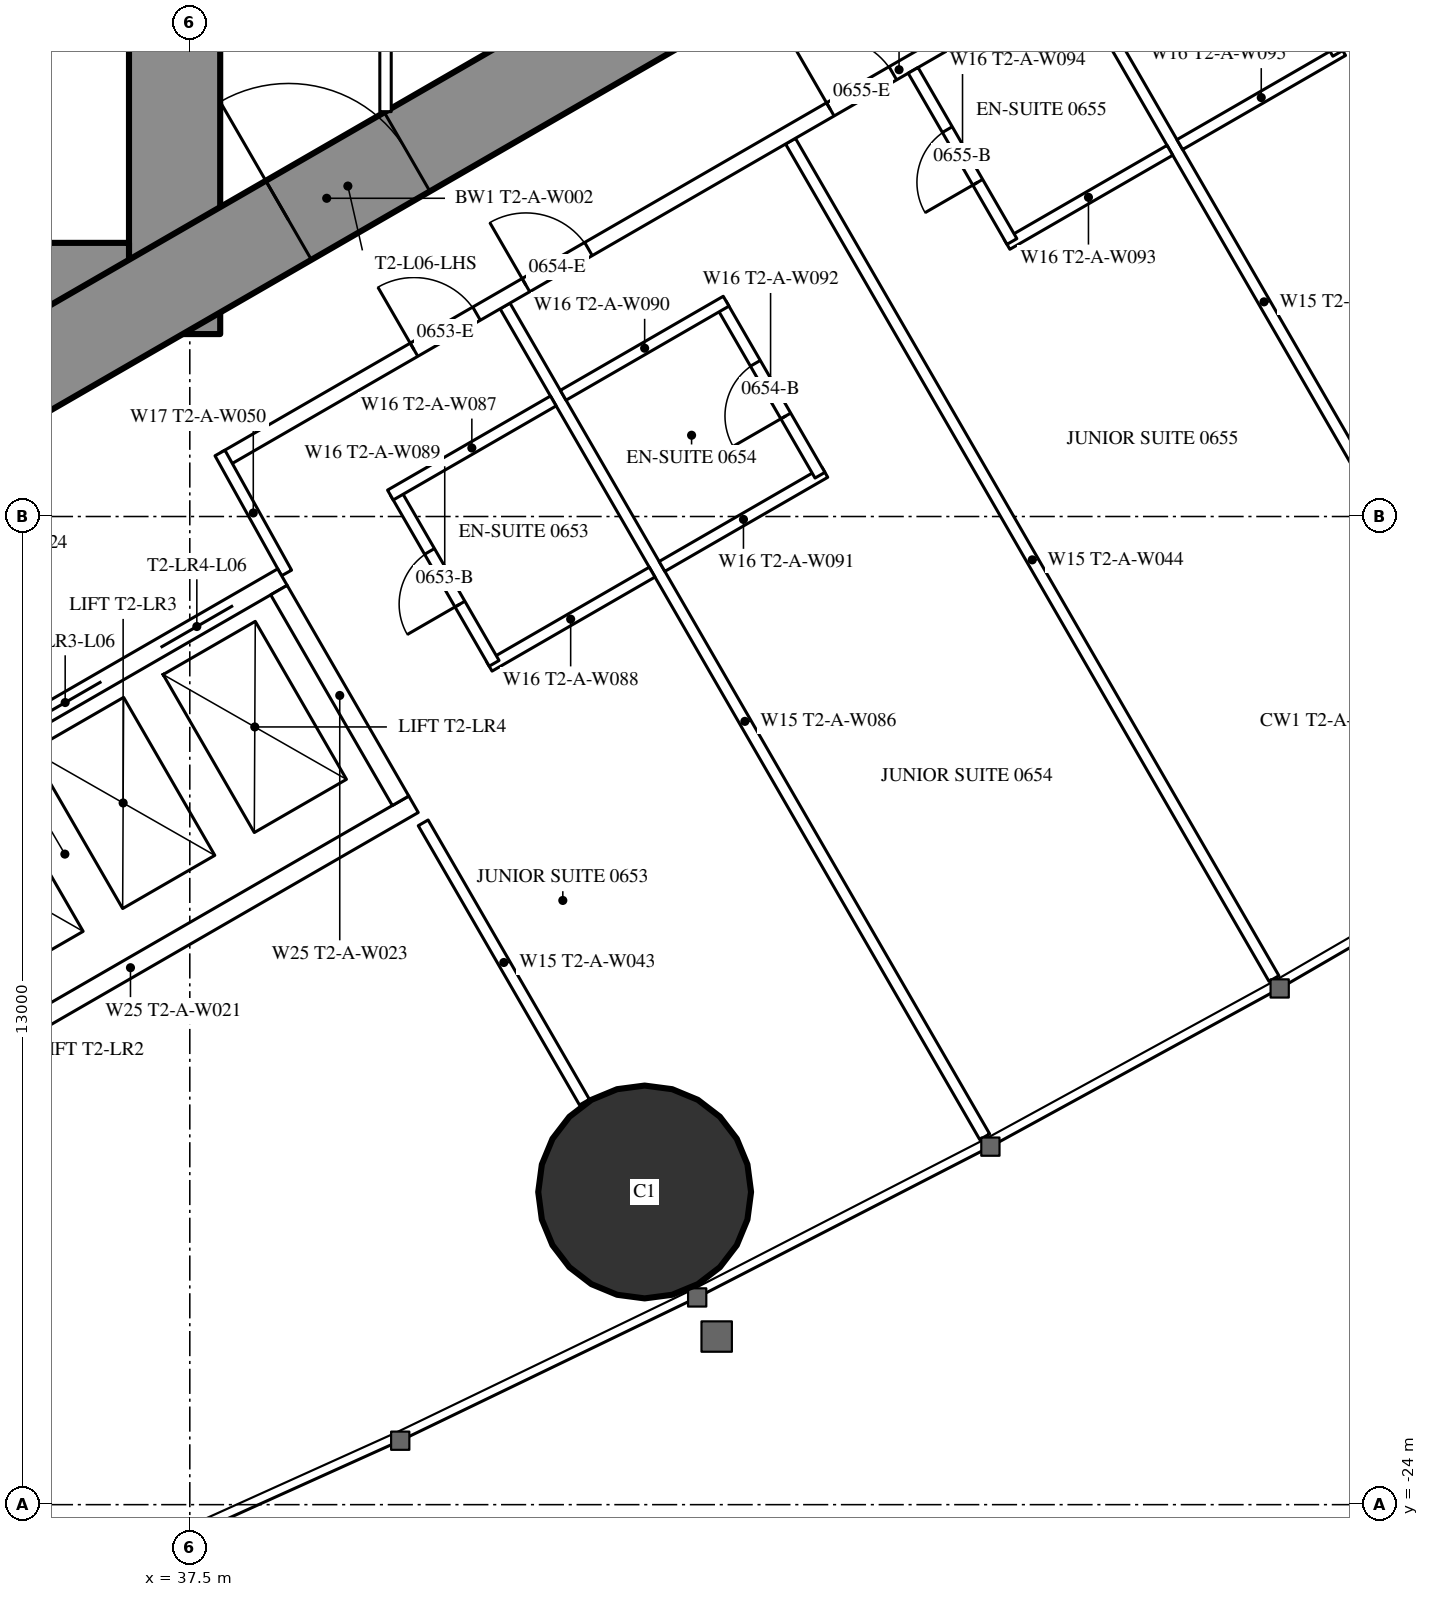
"""IFC4 building model, lengths in metres.
Left out: names, types, materials, properties, quantities, classifications, styles, units other than length and angle.
Written with IfcOpenShell. Run it as: python <this file> out.ifc"""

import sys

from ifc_helpers import new_model, si_unit, direction, frame, frame_2d, origin, origin_2d, place, context, subcontext, project, spatial, rectangle, hollow_circle, extrude, element, fill, save


model = new_model("IFC4")
c1 = context("Model", 3, precision=1e-05, world=origin(), true_north=direction((0.0, 1.0)))
c2 = subcontext(c1, "Body", "Model", "MODEL_VIEW")
j1 = project(units=[si_unit("LENGTHUNIT", "METRE"), si_unit("PLANEANGLEUNIT", "RADIAN")], contexts=[c1])
p1 = place(None, origin())
s1 = spatial("IfcSite", under=j1, at=p1, CompositionType="ELEMENT")
p2 = place(p1, origin())
s2 = spatial("IfcBuilding", under=s1, at=p2, CompositionType="ELEMENT")
p3 = place(p2, frame((0.0, 0.0, 28.5)))
s3 = spatial("IfcBuildingStorey", under=s2, at=p3, CompositionType="ELEMENT", Elevation=28.5)
p4 = place(p3, frame((43.484, -19.886, 0.0), z_axis=(0.0, 0.0, 1.0), x_axis=(1.0, 0.0, 0.0)))
e1 = element("IfcColumn", 1, at=p4, inside=s3, PredefinedType="COLUMN", context=c2, shape_type="SweptSolid", body=[
    extrude(hollow_circle(Radius=1.4, WallThickness=0.12, at=origin_2d()), origin(), (0.0, 0.0, 1.0), 3.5),
])
p5 = place(p3, frame((37.3, -8.6, 0.0), z_axis=(0.0, 0.0, 1.0), x_axis=(0.0, 1.0, 0.0)))
e2 = element("IfcWall", 2, at=p5, inside=s3, PredefinedType="SHEAR", context=c2, shape_type="SweptSolid", body=[
    extrude(rectangle(XDim=17.2, YDim=1.2, at=frame_2d((8.6, 0.0))), origin(), (0.0, 0.0, 1.0), 3.5),
])
p6 = place(p5, frame((7.7, 0.0, 0.0)))
e3 = element("IfcOpeningElement", 3, at=p6, cuts=e2, PredefinedType="OPENING", context=c2, shape_type="SweptSolid", body=[
    extrude(rectangle(XDim=1.8, YDim=2.2, at=frame_2d((0.9, 1.1))), frame((0.0, 0.61, 0.0), z_axis=(0.0, -1.0, 0.0), x_axis=(1.0, 0.0, 0.0)), (0.0, 0.0, 1.0), 1.22),
])
p7 = place(p3, frame((28.3, -8.0, 0.0), z_axis=(0.0, 0.0, 1.0), x_axis=(1.0, 0.0, 0.0)))
e4 = element("IfcWall", 4, at=p7, inside=s3, PredefinedType="SHEAR", context=c2, shape_type="SweptSolid", body=[
    extrude(rectangle(XDim=8.4, YDim=1.2, at=frame_2d((4.2, 0.0))), origin(), (0.0, 0.0, 1.0), 3.5),
])
p8 = place(p7, frame((0.25, 0.0, 0.0)))
e5 = element("IfcOpeningElement", 5, at=p8, cuts=e4, PredefinedType="OPENING", context=c2, shape_type="SweptSolid", body=[
    extrude(rectangle(XDim=1.0, YDim=2.2, at=frame_2d((0.5, 1.1))), frame((0.0, 0.61, 0.0), z_axis=(0.0, -1.0, 0.0), x_axis=(1.0, 0.0, 0.0)), (0.0, 0.0, 1.0), 1.22),
])
p9 = place(p3, frame((27.2, -13.8, 0.0), z_axis=(0.0, 0.0, 1.0), x_axis=(0.866027159892, 0.499996958321, 0.0)))
e6 = element("IfcWall", 6, at=p9, inside=s3, PredefinedType="SHEAR", context=c2, shape_type="SweptSolid", body=[
    extrude(rectangle(XDim=27.947, YDim=1.2, at=frame_2d((13.973, 0.0))), origin(), (0.0, 0.0, 1.0), 3.5),
])
p10 = place(p9, frame((4.6, 0.0, 0.0)))
e7 = element("IfcOpeningElement", 7, at=p10, cuts=e6, PredefinedType="OPENING", context=c2, shape_type="SweptSolid", body=[
    extrude(rectangle(XDim=1.0, YDim=2.2, at=frame_2d((0.5, 1.1))), frame((0.0, 0.61, 0.0), z_axis=(0.0, -1.0, 0.0), x_axis=(1.0, 0.0, 0.0)), (0.0, 0.0, 1.0), 1.22),
])
p11 = place(p9, frame((13.395, 0.0, 0.0)))
e8 = element("IfcOpeningElement", 8, at=p11, cuts=e6, PredefinedType="OPENING", context=c2, shape_type="SweptSolid", body=[
    extrude(rectangle(XDim=1.8, YDim=2.2, at=frame_2d((0.9, 1.1))), frame((0.0, 0.61, 0.0), z_axis=(0.0, -1.0, 0.0), x_axis=(1.0, 0.0, 0.0)), (0.0, 0.0, 1.0), 1.22),
])
p12 = place(p3, frame((41.647, -8.23, 0.0), z_axis=(0.0, 0.0, 1.0), x_axis=(0.49998590462, -0.866033541603, 0.0)))
e9 = element("IfcWall", 9, at=p12, inside=s3, PredefinedType="PARTITIONING", context=c2, shape_type="SweptSolid", body=[
    extrude(rectangle(XDim=12.621, YDim=0.15, at=frame_2d((6.311, 0.0))), origin(), (0.0, 0.0, 1.0), 3.25),
])
p13 = place(p3, frame((45.403, -6.062, 0.0), z_axis=(0.0, 0.0, 1.0), x_axis=(0.500007077968, -0.866021317279, 0.0)))
e10 = element("IfcWall", 10, at=p13, inside=s3, PredefinedType="PARTITIONING", context=c2, shape_type="SweptSolid", body=[
    extrude(rectangle(XDim=12.721, YDim=0.15, at=frame_2d((6.361, 0.0))), origin(), (0.0, 0.0, 1.0), 3.25),
])
p14 = place(p3, frame((49.159, -3.893, 0.0), z_axis=(0.0, 0.0, 1.0), x_axis=(0.499998773722, -0.866026111775, 0.0)))
e11 = element("IfcWall", 11, at=p14, inside=s3, PredefinedType="PARTITIONING", context=c2, shape_type="SweptSolid", body=[
    extrude(rectangle(XDim=9.892, YDim=0.15, at=frame_2d((4.946, 0.0))), origin(), (0.0, 0.0, 1.0), 2.25),
])
p15 = place(p3, frame((40.57, -15.03, 0.0), z_axis=(0.0, 0.0, 1.0), x_axis=(0.500012993597, -0.866017901798, 0.0)))
e12 = element("IfcWall", 12, at=p15, inside=s3, PredefinedType="PARTITIONING", context=c2, shape_type="SweptSolid", body=[
    extrude(rectangle(XDim=4.243, YDim=0.15, at=frame_2d((2.122, 0.0))), origin(), (0.0, 0.0, 1.0), 3.25),
])
p16 = place(p3, frame((37.96, -10.243, 0.0), z_axis=(0.0, 0.0, 1.0), x_axis=(0.866026429433, 0.499998223521, 0.0)))
e13 = element("IfcWall", 13, at=p16, inside=s3, PredefinedType="PARTITIONING", context=c2, shape_type="SweptSolid", body=[
    extrude(rectangle(XDim=20.487, YDim=0.2, at=frame_2d((10.243, 0.0))), origin(), (0.0, 0.0, 1.0), 3.25),
])
p17 = place(p16, frame((4.575, 0.0, 0.0)))
e14 = element("IfcOpeningElement", 14, at=p17, cuts=e13, PredefinedType="OPENING", context=c2, shape_type="SweptSolid", body=[
    extrude(rectangle(XDim=0.95, YDim=2.2, at=frame_2d((0.475, 1.1))), frame((0.0, 0.11, 0.0), z_axis=(0.0, -1.0, 0.0), x_axis=(1.0, 0.0, 0.0)), (0.0, 0.0, 1.0), 0.22),
])
p18 = place(p16, frame((9.199, 0.0, 0.0)))
e15 = element("IfcOpeningElement", 15, at=p18, cuts=e13, PredefinedType="OPENING", context=c2, shape_type="SweptSolid", body=[
    extrude(rectangle(XDim=0.95, YDim=2.2, at=frame_2d((0.475, 1.1))), frame((0.0, 0.11, 0.0), z_axis=(0.0, -1.0, 0.0), x_axis=(1.0, 0.0, 0.0)), (0.0, 0.0, 1.0), 0.22),
])
p19 = place(p16, frame((15.599, 0.0, 0.0)))
e16 = element("IfcOpeningElement", 16, at=p19, cuts=e13, PredefinedType="OPENING", context=c2, shape_type="SweptSolid", body=[
    extrude(rectangle(XDim=0.95, YDim=2.2, at=frame_2d((0.475, 1.1))), frame((0.0, 0.11, 0.0), z_axis=(0.0, -1.0, 0.0), x_axis=(1.0, 0.0, 0.0)), (0.0, 0.0, 1.0), 0.22),
])
p20 = place(p16, frame((2.875, 0.0, 0.0)))
e17 = element("IfcOpeningElement", 17, at=p20, cuts=e13, PredefinedType="OPENING", context=c2, shape_type="SweptSolid", body=[
    extrude(rectangle(XDim=0.95, YDim=2.2, at=frame_2d((0.475, 1.1))), frame((0.0, 0.11, 0.0), z_axis=(0.0, -1.0, 0.0), x_axis=(1.0, 0.0, 0.0)), (0.0, 0.0, 1.0), 0.22),
])
p21 = place(p3, frame((38.773, -11.742, 0.0), z_axis=(0.0, 0.0, 1.0), x_axis=(-0.485528096672, 0.8742210632, 0.0)))
e18 = element("IfcWall", 18, at=p21, inside=s3, PredefinedType="PARTITIONING", context=c2, shape_type="SweptSolid", body=[
    extrude(rectangle(XDim=1.805, YDim=0.15, at=frame_2d((0.903, 0.0))), origin(), (0.0, 0.0, 1.0), 3.25),
])
p22 = place(p3, frame((43.712, -11.657, 0.0), z_axis=(0.0, 0.0, 1.0), x_axis=(0.866006523861, 0.500032699561, 0.0)))
e19 = element("IfcWall", 19, at=p22, inside=s3, PredefinedType="PARTITIONING", context=c2, shape_type="SweptSolid", body=[
    extrude(rectangle(XDim=2.475, YDim=0.15, at=frame_2d((1.237, 0.0))), origin(), (0.0, 0.0, 1.0), 3.25),
])
p23 = place(p3, frame((44.491, -8.205, 0.0), z_axis=(0.0, 0.0, 1.0), x_axis=(0.500047596559, -0.865997922154, 0.0)))
e20 = element("IfcWall", 20, at=p23, inside=s3, PredefinedType="PARTITIONING", context=c2, shape_type="SweptSolid", body=[
    extrude(rectangle(XDim=2.6, YDim=0.15, at=frame_2d((1.3, 0.0))), origin(), (0.0, 0.0, 1.0), 3.25),
])
p24 = place(p23, frame((0.9, 0.0, 0.0)))
e21 = element("IfcOpeningElement", 21, at=p24, cuts=e20, PredefinedType="OPENING", context=c2, shape_type="SweptSolid", body=[
    extrude(rectangle(XDim=0.8, YDim=2.2, at=frame_2d((0.4, 1.1))), frame((0.0, 0.085, 0.0), z_axis=(0.0, -1.0, 0.0), x_axis=(1.0, 0.0, 0.0)), (0.0, 0.0, 1.0), 0.17),
])
for number, where, z_axis, x_axis in (
    (22, (42.412, -9.405, 0.0), (0.0, 0.0, 1.0), (0.866, 0.5, 0.0)),
    (23, (48.251, -7.42, 0.0), (0.0, 0.0, 1.0), (0.866, 0.5, 0.0)),
):
    element("IfcWall", number, at=place(p3, frame(where, z_axis=z_axis, x_axis=x_axis)), inside=s3, PredefinedType="PARTITIONING", context=c2, shape_type="SweptSolid", body=[
        extrude(rectangle(XDim=2.475, YDim=0.15, at=frame_2d((1.237, 0.0))), origin(), (0.0, 0.0, 1.0), 3.25),
    ])
p25 = place(p3, frame((47.016, -5.13, 0.0), z_axis=(0.0, 0.0, 1.0), x_axis=(0.500006934395, -0.866021400173, 0.0)))
e24 = element("IfcWall", 24, at=p25, inside=s3, PredefinedType="PARTITIONING", context=c2, shape_type="SweptSolid", body=[
    extrude(rectangle(XDim=2.6, YDim=0.15, at=frame_2d((1.3, 0.0))), origin(), (0.0, 0.0, 1.0), 3.25),
])
p26 = place(p25, frame((0.9, 0.0, 0.0)))
e25 = element("IfcOpeningElement", 25, at=p26, cuts=e24, PredefinedType="OPENING", context=c2, shape_type="SweptSolid", body=[
    extrude(rectangle(XDim=0.8, YDim=2.2, at=frame_2d((0.4, 1.1))), frame((0.0, 0.085, 0.0), z_axis=(0.0, -1.0, 0.0), x_axis=(1.0, 0.0, 0.0)), (0.0, 0.0, 1.0), 0.17),
])
p27 = place(p3, frame((50.524, -6.107, 0.0), z_axis=(0.0, 0.0, 1.0), x_axis=(0.866031185235, 0.4999899861, 0.0)))
e26 = element("IfcWall", 26, at=p27, inside=s3, PredefinedType="PARTITIONING", context=c2, shape_type="SweptSolid", body=[
    extrude(rectangle(XDim=2.475, YDim=0.15, at=frame_2d((1.238, 0.0))), origin(), (0.0, 0.0, 1.0), 3.25),
])
p28 = place(p3, frame((51.303, -2.656, 0.0), z_axis=(0.0, 0.0, 1.0), x_axis=(0.500047596559, -0.865997922154, 0.0)))
e27 = element("IfcWall", 27, at=p28, inside=s3, PredefinedType="PARTITIONING", context=c2, shape_type="SweptSolid", body=[
    extrude(rectangle(XDim=2.6, YDim=0.15, at=frame_2d((1.3, 0.0))), origin(), (0.0, 0.0, 1.0), 3.25),
])
p29 = place(p28, frame((0.9, 0.0, 0.0)))
e28 = element("IfcOpeningElement", 28, at=p29, cuts=e27, PredefinedType="OPENING", context=c2, shape_type="SweptSolid", body=[
    extrude(rectangle(XDim=0.8, YDim=2.2, at=frame_2d((0.4, 1.1))), frame((0.0, 0.085, 0.0), z_axis=(0.0, -1.0, 0.0), x_axis=(1.0, 0.0, 0.0)), (0.0, 0.0, 1.0), 0.17),
])
p30 = place(p3, frame((41.439, -12.969, 0.0), z_axis=(0.0, 0.0, 1.0), x_axis=(0.866031185235, 0.4999899861, 0.0)))
e29 = element("IfcWall", 29, at=p30, inside=s3, PredefinedType="PARTITIONING", context=c2, shape_type="SweptSolid", body=[
    extrude(rectangle(XDim=2.475, YDim=0.15, at=frame_2d((1.238, 0.0))), origin(), (0.0, 0.0, 1.0), 3.25),
])
p31 = place(p3, frame((40.204, -10.68, 0.0), z_axis=(0.0, 0.0, 1.0), x_axis=(0.500006934395, -0.866021400173, 0.0)))
e30 = element("IfcWall", 30, at=p31, inside=s3, PredefinedType="PARTITIONING", context=c2, shape_type="SweptSolid", body=[
    extrude(rectangle(XDim=2.6, YDim=0.15, at=frame_2d((1.3, 0.0))), origin(), (0.0, 0.0, 1.0), 3.25),
])
p32 = place(p31, frame((0.9, 0.0, 0.0)))
e31 = element("IfcOpeningElement", 31, at=p32, cuts=e30, PredefinedType="OPENING", context=c2, shape_type="SweptSolid", body=[
    extrude(rectangle(XDim=0.8, YDim=2.2, at=frame_2d((0.4, 1.1))), frame((0.0, 0.085, 0.0), z_axis=(0.0, -1.0, 0.0), x_axis=(1.0, 0.0, 0.0)), (0.0, 0.0, 1.0), 0.17),
])
p33 = place(p3, frame((40.139, -10.718, 0.0), z_axis=(0.0, 0.0, 1.0), x_axis=(0.866031185235, 0.4999899861, 0.0)))
e32 = element("IfcWall", 32, at=p33, inside=s3, PredefinedType="PARTITIONING", context=c2, shape_type="SweptSolid", body=[
    extrude(rectangle(XDim=2.475, YDim=0.15, at=frame_2d((1.238, 0.0))), origin(), (0.0, 0.0, 1.0), 3.25),
])
p34 = place(p3, frame((40.075, -5.674, 0.0), z_axis=(0.0, 0.0, 1.0), x_axis=(0.0, 1.0, 0.0)))
e33 = element("IfcWall", 33, at=p34, inside=s3, PredefinedType="PARTITIONING", context=c2, shape_type="SweptSolid", body=[
    extrude(rectangle(XDim=6.874, YDim=0.15, at=frame_2d((3.437, 0.0))), origin(), (0.0, 0.0, 1.0), 3.25),
])
p35 = place(p34, frame((2.537, 0.0, 0.0)))
e34 = element("IfcOpeningElement", 34, at=p35, cuts=e33, PredefinedType="OPENING", context=c2, shape_type="SweptSolid", body=[
    extrude(rectangle(XDim=1.8, YDim=2.2, at=frame_2d((0.9, 1.1))), frame((0.0, 0.085, 0.0), z_axis=(0.0, -1.0, 0.0), x_axis=(1.0, 0.0, 0.0)), (0.0, 0.0, 1.0), 0.17),
])
p36 = place(p3, frame((31.271, -16.097, 0.0), z_axis=(0.0, 0.0, 1.0), x_axis=(0.86604045752, 0.499973925258, 0.0)))
e35 = element("IfcWall", 35, at=p36, inside=s3, PredefinedType="PARTITIONING", context=c2, shape_type="SweptSolid", body=[
    extrude(rectangle(XDim=8.6, YDim=0.25, at=frame_2d((4.3, 0.0))), origin(), (0.0, 0.0, 1.0), 3.25),
])
p37 = place(p36, frame((0.75, 0.0, 0.0)))
e36 = element("IfcOpeningElement", 36, at=p37, cuts=e35, PredefinedType="OPENING", context=c2, shape_type="SweptSolid", body=[
    extrude(rectangle(XDim=1.1, YDim=2.2, at=frame_2d((0.55, 1.1))), frame((0.0, 0.135, 0.0), z_axis=(0.0, -1.0, 0.0), x_axis=(1.0, 0.0, 0.0)), (0.0, 0.0, 1.0), 0.27),
])
p38 = place(p36, frame((2.75, 0.0, 0.0)))
e37 = element("IfcOpeningElement", 37, at=p38, cuts=e35, PredefinedType="OPENING", context=c2, shape_type="SweptSolid", body=[
    extrude(rectangle(XDim=1.1, YDim=2.2, at=frame_2d((0.55, 1.1))), frame((0.0, 0.135, 0.0), z_axis=(0.0, -1.0, 0.0), x_axis=(1.0, 0.0, 0.0)), (0.0, 0.0, 1.0), 0.27),
])
p39 = place(p36, frame((4.75, 0.0, 0.0)))
e38 = element("IfcOpeningElement", 38, at=p39, cuts=e35, PredefinedType="OPENING", context=c2, shape_type="SweptSolid", body=[
    extrude(rectangle(XDim=1.1, YDim=2.2, at=frame_2d((0.55, 1.1))), frame((0.0, 0.135, 0.0), z_axis=(0.0, -1.0, 0.0), x_axis=(1.0, 0.0, 0.0)), (0.0, 0.0, 1.0), 0.27),
])
p40 = place(p36, frame((6.75, 0.0, 0.0)))
e39 = element("IfcOpeningElement", 39, at=p40, cuts=e35, PredefinedType="OPENING", context=c2, shape_type="SweptSolid", body=[
    extrude(rectangle(XDim=1.1, YDim=2.2, at=frame_2d((0.55, 1.1))), frame((0.0, 0.135, 0.0), z_axis=(0.0, -1.0, 0.0), x_axis=(1.0, 0.0, 0.0)), (0.0, 0.0, 1.0), 0.27),
])
p41 = place(p3, frame((32.996, -19.086, 0.0), z_axis=(0.0, 0.0, 1.0), x_axis=(0.866028165386, 0.499995216735, 0.0)))
e40 = element("IfcWall", 40, at=p41, inside=s3, PredefinedType="PARTITIONING", context=c2, shape_type="SweptSolid", body=[
    extrude(rectangle(XDim=8.6, YDim=0.25, at=frame_2d((4.3, 0.0))), origin(), (0.0, 0.0, 1.0), 3.25),
])
p42 = place(p3, frame((38.673, -11.968, 0.0), z_axis=(0.0, 0.0, 1.0), x_axis=(0.499929347863, -0.866066190972, 0.0)))
e41 = element("IfcWall", 41, at=p42, inside=s3, PredefinedType="PARTITIONING", context=c2, shape_type="SweptSolid", body=[
    extrude(rectangle(XDim=3.201, YDim=0.25, at=frame_2d((1.6, 0.0))), origin(), (0.0, 0.0, 1.0), 3.25),
])
p43 = place(p24, origin())
e42 = element("IfcDoor", 42, at=p43, inside=s3, OperationType="SINGLE_SWING_RIGHT", PredefinedType="DOOR", context=c2, shape_type="SweptSolid", body=[
    extrude(rectangle(XDim=0.8, YDim=2.2, at=frame_2d((0.4, 1.1))), frame((0.0, 0.025, 0.0), z_axis=(0.0, -1.0, 0.0), x_axis=(1.0, 0.0, 0.0)), (0.0, 0.0, 1.0), 0.05),
])
fill(e21, e42)
p44 = place(p17, origin())
e43 = element("IfcDoor", 43, at=p44, inside=s3, OperationType="SINGLE_SWING_LEFT", PredefinedType="DOOR", context=c2, shape_type="SweptSolid", body=[
    extrude(rectangle(XDim=0.95, YDim=2.2, at=frame_2d((0.475, 1.1))), frame((0.0, 0.025, 0.0), z_axis=(0.0, -1.0, 0.0), x_axis=(1.0, 0.0, 0.0)), (0.0, 0.0, 1.0), 0.05),
])
fill(e14, e43)
p45 = place(p26, origin())
e44 = element("IfcDoor", 44, at=p45, inside=s3, OperationType="SINGLE_SWING_RIGHT", PredefinedType="DOOR", context=c2, shape_type="SweptSolid", body=[
    extrude(rectangle(XDim=0.8, YDim=2.2, at=frame_2d((0.4, 1.1))), frame((0.0, 0.025, 0.0), z_axis=(0.0, -1.0, 0.0), x_axis=(1.0, 0.0, 0.0)), (0.0, 0.0, 1.0), 0.05),
])
fill(e25, e44)
p46 = place(p18, origin())
e45 = element("IfcDoor", 45, at=p46, inside=s3, OperationType="SINGLE_SWING_LEFT", PredefinedType="DOOR", context=c2, shape_type="SweptSolid", body=[
    extrude(rectangle(XDim=0.95, YDim=2.2, at=frame_2d((0.475, 1.1))), frame((0.0, 0.025, 0.0), z_axis=(0.0, -1.0, 0.0), x_axis=(1.0, 0.0, 0.0)), (0.0, 0.0, 1.0), 0.05),
])
fill(e15, e45)
p47 = place(p32, origin())
e46 = element("IfcDoor", 46, at=p47, inside=s3, OperationType="SINGLE_SWING_RIGHT", PredefinedType="DOOR", context=c2, shape_type="SweptSolid", body=[
    extrude(rectangle(XDim=0.8, YDim=2.2, at=frame_2d((0.4, 1.1))), frame((0.0, 0.025, 0.0), z_axis=(0.0, -1.0, 0.0), x_axis=(1.0, 0.0, 0.0)), (0.0, 0.0, 1.0), 0.05),
])
fill(e31, e46)
p48 = place(p20, origin())
e47 = element("IfcDoor", 47, at=p48, inside=s3, OperationType="SINGLE_SWING_LEFT", PredefinedType="DOOR", context=c2, shape_type="SweptSolid", body=[
    extrude(rectangle(XDim=0.95, YDim=2.2, at=frame_2d((0.475, 1.1))), frame((0.0, 0.025, 0.0), z_axis=(0.0, -1.0, 0.0), x_axis=(1.0, 0.0, 0.0)), (0.0, 0.0, 1.0), 0.05),
])
fill(e17, e47)
p49 = place(p11, origin())
e48 = element("IfcDoor", 48, at=p49, inside=s3, OperationType="DOUBLE_DOOR_SINGLE_SWING", PredefinedType="DOOR", context=c2, shape_type="SweptSolid", body=[
    extrude(rectangle(XDim=1.8, YDim=2.2, at=frame_2d((0.9, 1.1))), frame((0.0, 0.025, 0.0), z_axis=(0.0, -1.0, 0.0), x_axis=(1.0, 0.0, 0.0)), (0.0, 0.0, 1.0), 0.05),
])
fill(e8, e48)
p50 = place(p39, origin())
e49 = element("IfcDoor", 49, at=p50, inside=s3, OperationType="DOUBLE_DOOR_SLIDING", PredefinedType="USERDEFINED", context=c2, shape_type="SweptSolid", body=[
    extrude(rectangle(XDim=1.1, YDim=2.2, at=frame_2d((0.55, 1.1))), frame((0.0, 0.025, 0.0), z_axis=(0.0, -1.0, 0.0), x_axis=(1.0, 0.0, 0.0)), (0.0, 0.0, 1.0), 0.05),
])
fill(e38, e49)
p51 = place(p40, origin())
e50 = element("IfcDoor", 50, at=p51, inside=s3, OperationType="DOUBLE_DOOR_SLIDING", PredefinedType="USERDEFINED", context=c2, shape_type="SweptSolid", body=[
    extrude(rectangle(XDim=1.1, YDim=2.2, at=frame_2d((0.55, 1.1))), frame((0.0, 0.025, 0.0), z_axis=(0.0, -1.0, 0.0), x_axis=(1.0, 0.0, 0.0)), (0.0, 0.0, 1.0), 0.05),
])
fill(e39, e50)
save(model, sys.argv[1])
